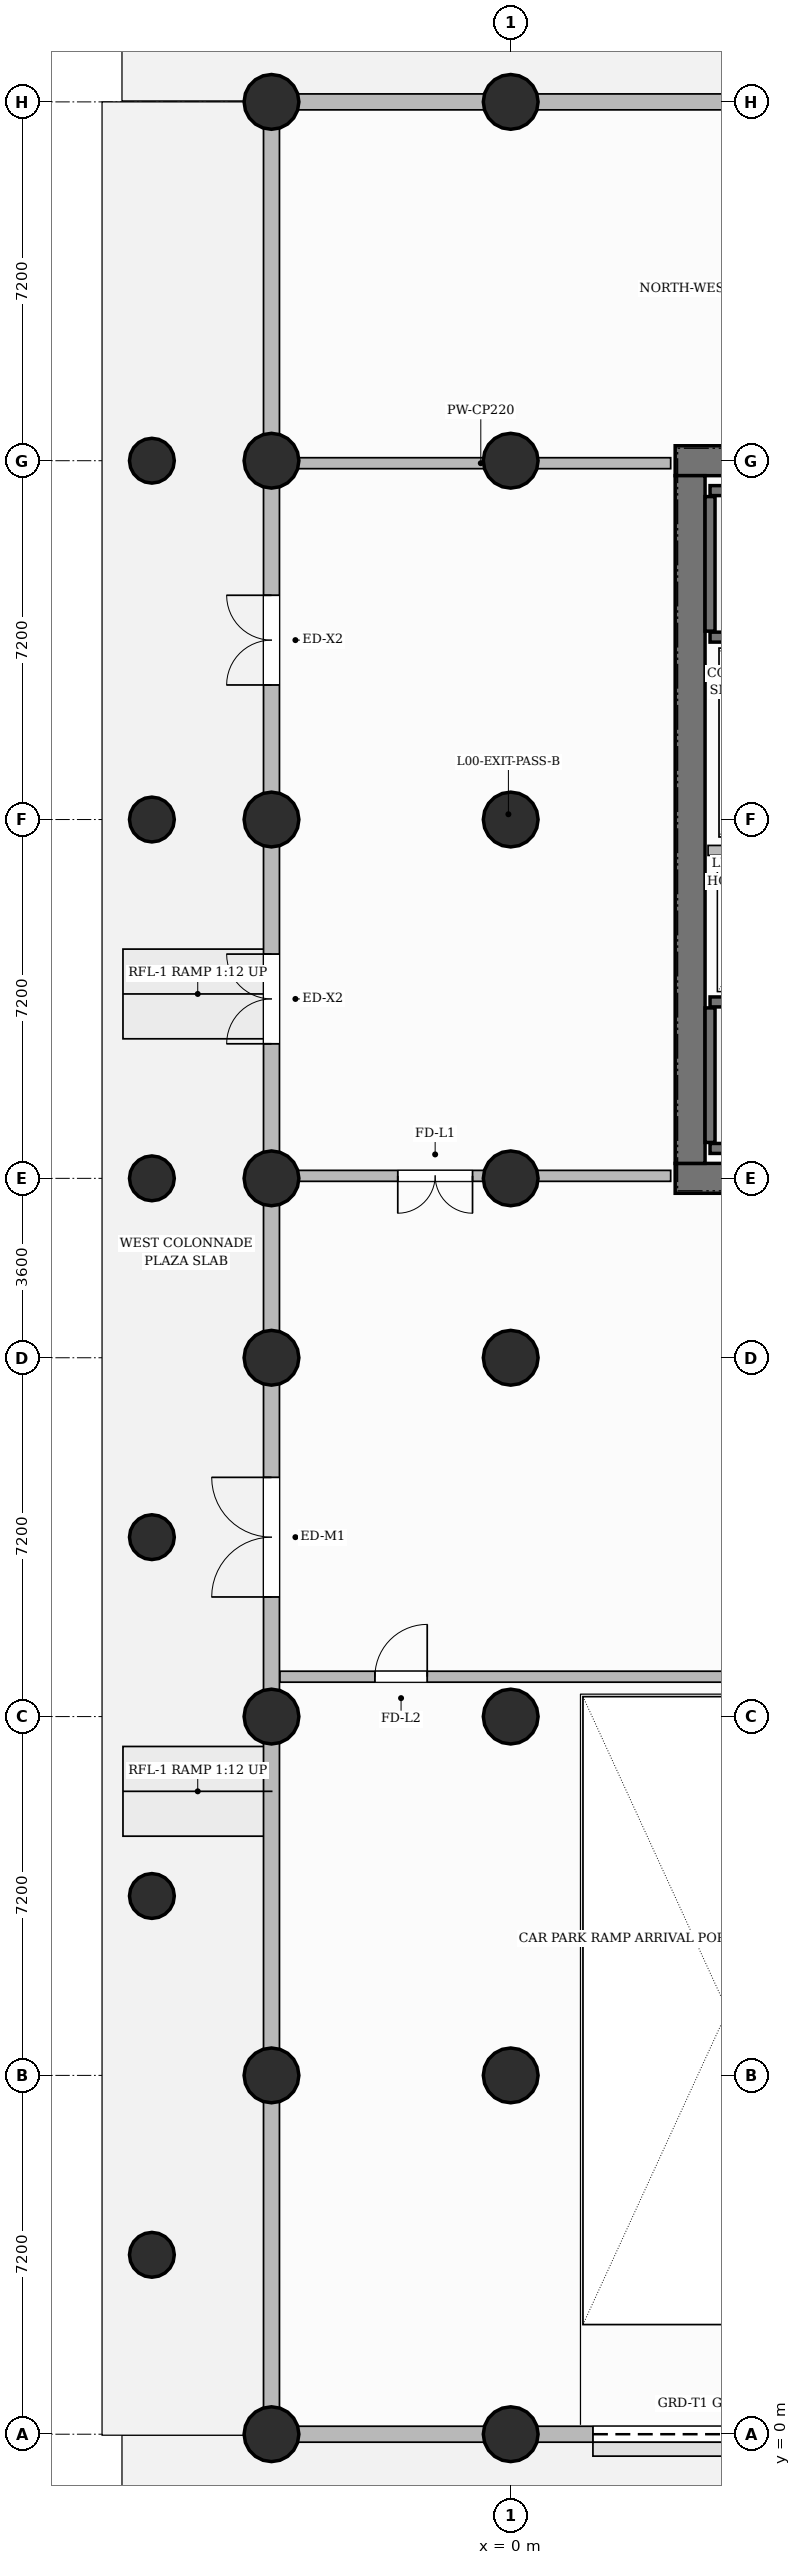
"""IFC4 building model, lengths in metres.
Left out: names, types, materials, properties, quantities, classifications, styles, units other than length and angle.
Written with IfcOpenShell. Run it as: python <this file> out.ifc"""

import sys

from ifc_helpers import new_model, si_unit, direction, frame, frame_2d, origin, origin_2d, place, context, subcontext, project, spatial, rectangle, circle, extrude, source, transform, mapped, element, fill, save


model = new_model("IFC4")
c1 = context("Model", 3, precision=1e-05, world=origin(), true_north=direction((0.0, 1.0)))
c2 = subcontext(c1, "Body", "Model", "MODEL_VIEW")
j1 = project(units=[si_unit("LENGTHUNIT", "METRE"), si_unit("PLANEANGLEUNIT", "RADIAN")], contexts=[c1])
p1 = place(None, origin())
s1 = spatial("IfcSite", under=j1, at=p1, CompositionType="ELEMENT")
p2 = place(p1, origin())
s2 = spatial("IfcBuilding", under=s1, at=p2, CompositionType="ELEMENT")
p3 = place(p2, origin())
s3 = spatial("IfcBuildingStorey", under=s2, at=p3, CompositionType="ELEMENT", Elevation=0.0)
for number, where, z_axis, x_axis in (
    (1, (3.3, 25.2, 0.0), (0.0, 0.0, 1.0), (1.0, 0.0, 0.0)),
    (2, (3.3, 39.6, 0.0), (0.0, 0.0, 1.0), (1.0, 0.0, 0.0)),
):
    element("IfcWall", number, at=place(p3, frame(where, z_axis=z_axis, x_axis=x_axis)), inside=s3, PredefinedType="SHEAR", context=c2, shape_type="SweptSolid", body=[
        extrude(rectangle(XDim=8.4, YDim=0.6, at=frame_2d((4.2, 0.0))), origin(), (0.0, 0.0, 1.0), 5.4),
    ])
p4 = place(p3, frame((3.6, 25.5, 0.0), z_axis=(0.0, 0.0, 1.0), x_axis=(0.0, 1.0, 0.0)))
e3 = element("IfcWall", 3, at=p4, inside=s3, PredefinedType="SHEAR", context=c2, shape_type="SweptSolid", body=[
    extrude(rectangle(XDim=13.8, YDim=0.6, at=frame_2d((6.9, 0.0))), origin(), (0.0, 0.0, 1.0), 5.4),
])
m1 = source(origin(), c2, "Body", "SweptSolid", [
    extrude(circle(Radius=0.55, at=origin_2d()), origin(), (0.0, 0.0, 1.0), 5.4),
])
for number, where, z_axis, x_axis in (
    (4, (-4.8, 0.0, 0.0), (0.0, 0.0, 1.0), (1.0, 0.0, 0.0)),
    (5, (-4.8, 7.2, 0.0), (0.0, 0.0, 1.0), (1.0, 0.0, 0.0)),
    (6, (-4.8, 14.4, 0.0), (0.0, 0.0, 1.0), (1.0, 0.0, 0.0)),
    (7, (-4.8, 21.6, 0.0), (0.0, 0.0, 1.0), (1.0, 0.0, 0.0)),
    (8, (-4.8, 25.2, 0.0), (0.0, 0.0, 1.0), (1.0, 0.0, 0.0)),
    (9, (-4.8, 32.4, 0.0), (0.0, 0.0, 1.0), (1.0, 0.0, 0.0)),
    (10, (-4.8, 39.6, 0.0), (0.0, 0.0, 1.0), (1.0, 0.0, 0.0)),
    (11, (-4.8, 46.8, 0.0), (0.0, 0.0, 1.0), (1.0, 0.0, 0.0)),
    (12, (0.0, 0.0, 0.0), (0.0, 0.0, 1.0), (1.0, 0.0, 0.0)),
    (13, (0.0, 7.2, 0.0), (0.0, 0.0, 1.0), (1.0, 0.0, 0.0)),
    (14, (0.0, 14.4, 0.0), (0.0, 0.0, 1.0), (1.0, 0.0, 0.0)),
    (15, (0.0, 21.6, 0.0), (0.0, 0.0, 1.0), (1.0, 0.0, 0.0)),
    (16, (0.0, 25.2, 0.0), (0.0, 0.0, 1.0), (1.0, 0.0, 0.0)),
    (17, (0.0, 32.4, 0.0), (0.0, 0.0, 1.0), (1.0, 0.0, 0.0)),
    (18, (0.0, 39.6, 0.0), (0.0, 0.0, 1.0), (1.0, 0.0, 0.0)),
    (19, (0.0, 46.8, 0.0), (0.0, 0.0, 1.0), (1.0, 0.0, 0.0)),
):
    element("IfcColumn", number, at=place(p3, frame(where, z_axis=z_axis, x_axis=x_axis)), inside=s3, PredefinedType="COLUMN", context=c2, shape_type="MappedRepresentation", body=[
        mapped(m1, transform((0.0, 0.0, 0.0), scale=1.0)),
    ])
m2 = source(origin(), c2, "Body", "SweptSolid", [
    extrude(circle(Radius=0.45, at=origin_2d()), origin(), (0.0, 0.0, 1.0), 5.4),
])
for number, where, z_axis, x_axis in (
    (20, (-7.2, 3.6, 0.0), (0.0, 0.0, 1.0), (1.0, 0.0, 0.0)),
    (21, (-7.2, 10.8, 0.0), (0.0, 0.0, 1.0), (1.0, 0.0, 0.0)),
    (22, (-7.2, 18.0, 0.0), (0.0, 0.0, 1.0), (1.0, 0.0, 0.0)),
    (23, (-7.2, 25.2, 0.0), (0.0, 0.0, 1.0), (1.0, 0.0, 0.0)),
    (24, (-7.2, 32.4, 0.0), (0.0, 0.0, 1.0), (1.0, 0.0, 0.0)),
    (25, (-7.2, 39.6, 0.0), (0.0, 0.0, 1.0), (1.0, 0.0, 0.0)),
):
    element("IfcColumn", number, at=place(p3, frame(where, z_axis=z_axis, x_axis=x_axis)), inside=s3, PredefinedType="COLUMN", context=c2, shape_type="MappedRepresentation", body=[
        mapped(m2, transform((0.0, 0.0, 0.0), scale=1.0)),
    ])
p5 = place(p3, frame((4.0, 25.8, 0.0), z_axis=(0.0, 0.0, 1.0), x_axis=(1.0, 0.0, 0.0)))
e26 = element("IfcWall", 26, at=p5, inside=s3, PredefinedType="SHEAR", context=c2, shape_type="SweptSolid", body=[
    extrude(rectangle(XDim=7.1, YDim=0.2, at=frame_2d((3.55, 0.0))), origin(), (0.0, 0.0, 1.0), 5.4),
])
p6 = place(p3, frame((4.0, 25.92, 0.0), z_axis=(0.0, 0.0, 1.0), x_axis=(0.0, 1.0, 0.0)))
e27 = element("IfcWall", 27, at=p6, inside=s3, PredefinedType="SHEAR", context=c2, shape_type="SweptSolid", body=[
    extrude(rectangle(XDim=2.7, YDim=0.2, at=frame_2d((1.35, 0.0))), origin(), (0.0, 0.0, 1.0), 5.4),
])
p7 = place(p3, frame((4.0, 28.74, 0.0), z_axis=(0.0, 0.0, 1.0), x_axis=(1.0, 0.0, 0.0)))
e28 = element("IfcWall", 28, at=p7, inside=s3, PredefinedType="SHEAR", context=c2, shape_type="SweptSolid", body=[
    extrude(rectangle(XDim=7.1, YDim=0.2, at=frame_2d((3.55, 0.0))), origin(), (0.0, 0.0, 1.0), 5.4),
])
p8 = place(p7, frame((5.815, 0.0, 0.0)))
e29 = element("IfcOpeningElement", 29, at=p8, cuts=e28, PredefinedType="OPENING", context=c2, shape_type="SweptSolid", body=[
    extrude(rectangle(XDim=1.05, YDim=2.2, at=frame_2d((0.525, 1.1))), frame((0.0, 0.11, 0.0), z_axis=(0.0, -1.0, 0.0), x_axis=(1.0, 0.0, 0.0)), (0.0, 0.0, 1.0), 0.22),
])
p9 = place(p3, frame((4.0, 39.0, 0.0), z_axis=(0.0, 0.0, 1.0), x_axis=(1.0, 0.0, 0.0)))
e30 = element("IfcWall", 30, at=p9, inside=s3, PredefinedType="SHEAR", context=c2, shape_type="SweptSolid", body=[
    extrude(rectangle(XDim=7.1, YDim=0.2, at=frame_2d((3.55, 0.0))), origin(), (0.0, 0.0, 1.0), 5.4),
])
p10 = place(p3, frame((4.0, 36.18, 0.0), z_axis=(0.0, 0.0, 1.0), x_axis=(0.0, 1.0, 0.0)))
e31 = element("IfcWall", 31, at=p10, inside=s3, PredefinedType="SHEAR", context=c2, shape_type="SweptSolid", body=[
    extrude(rectangle(XDim=2.7, YDim=0.2, at=frame_2d((1.35, 0.0))), origin(), (0.0, 0.0, 1.0), 5.4),
])
p11 = place(p3, frame((4.0, 36.06, 0.0), z_axis=(0.0, 0.0, 1.0), x_axis=(1.0, 0.0, 0.0)))
e32 = element("IfcWall", 32, at=p11, inside=s3, PredefinedType="SHEAR", context=c2, shape_type="SweptSolid", body=[
    extrude(rectangle(XDim=7.1, YDim=0.2, at=frame_2d((3.55, 0.0))), origin(), (0.0, 0.0, 1.0), 5.4),
])
p12 = place(p11, frame((5.815, 0.0, 0.0)))
e33 = element("IfcOpeningElement", 33, at=p12, cuts=e32, PredefinedType="OPENING", context=c2, shape_type="SweptSolid", body=[
    extrude(rectangle(XDim=1.05, YDim=2.2, at=frame_2d((0.525, 1.1))), frame((0.0, 0.11, 0.0), z_axis=(0.0, -1.0, 0.0), x_axis=(1.0, 0.0, 0.0)), (0.0, 0.0, 1.0), 0.22),
])
p13 = place(p3, frame((3.96, 31.78, 0.0), z_axis=(0.0, 0.0, 1.0), x_axis=(1.0, 0.0, 0.0)))
e34 = element("IfcWall", 34, at=p13, inside=s3, PredefinedType="PARTITIONING", context=c2, shape_type="SweptSolid", body=[
    extrude(rectangle(XDim=2.13, YDim=0.2, at=frame_2d((1.065, 0.0))), origin(), (0.0, 0.0, 1.0), 5.1),
])
p14 = place(p3, frame((-4.41, 25.25, 0.0), z_axis=(0.0, 0.0, 1.0), x_axis=(1.0, 0.0, 0.0)))
e35 = element("IfcWall", 35, at=p14, inside=s3, PredefinedType="PARTITIONING", context=c2, shape_type="SweptSolid", body=[
    extrude(rectangle(XDim=7.62, YDim=0.22, at=frame_2d((3.81, 0.0))), origin(), (0.0, 0.0, 1.0), 4.085),
])
p15 = place(p14, frame((2.144, 0.0, 0.0)))
e36 = element("IfcOpeningElement", 36, at=p15, cuts=e35, PredefinedType="OPENING", context=c2, shape_type="SweptSolid", body=[
    extrude(rectangle(XDim=1.5, YDim=2.2, at=frame_2d((0.75, 1.1))), frame((0.0, 0.12, 0.0), z_axis=(0.0, -1.0, 0.0), x_axis=(1.0, 0.0, 0.0)), (0.0, 0.0, 1.0), 0.24),
])
p16 = place(p3, frame((-4.41, 39.55, 0.0), z_axis=(0.0, 0.0, 1.0), x_axis=(1.0, 0.0, 0.0)))
e37 = element("IfcWall", 37, at=p16, inside=s3, PredefinedType="PARTITIONING", context=c2, shape_type="SweptSolid", body=[
    extrude(rectangle(XDim=7.62, YDim=0.22, at=frame_2d((3.81, 0.0))), origin(), (0.0, 0.0, 1.0), 4.085),
])
p17 = place(p3, frame((-4.632, 15.2, 0.0), z_axis=(0.0, 0.0, 1.0), x_axis=(1.0, 0.0, 0.0)))
e38 = element("IfcWall", 38, at=p17, inside=s3, PredefinedType="PARTITIONING", context=c2, shape_type="SweptSolid", body=[
    extrude(rectangle(XDim=13.142, YDim=0.22, at=frame_2d((6.571, 0.0))), origin(), (0.0, 0.0, 1.0), 5.1),
])
p18 = place(p17, frame((1.907, 0.0, 0.0)))
e39 = element("IfcOpeningElement", 39, at=p18, cuts=e38, PredefinedType="OPENING", context=c2, shape_type="SweptSolid", body=[
    extrude(rectangle(XDim=1.05, YDim=2.15, at=frame_2d((0.525, 1.075))), frame((0.0, 0.12, 0.0), z_axis=(0.0, -1.0, 0.0), x_axis=(1.0, 0.0, 0.0)), (0.0, 0.0, 1.0), 0.24),
])
p19 = place(p3, frame((-4.8, 0.0, 0.0), z_axis=(0.0, 0.0, 1.0), x_axis=(1.0, 0.0, 0.0)))
e40 = element("IfcWall", 40, at=p19, inside=s3, PredefinedType="SOLIDWALL", context=c2, shape_type="SweptSolid", body=[
    extrude(rectangle(XDim=26.85, YDim=0.32, at=frame_2d((13.425, 0.0))), origin(), (0.0, 0.0, 1.0), 4.085),
])
p20 = place(p19, frame((6.45, 0.0, 0.0)))
e41 = element("IfcOpeningElement", 41, at=p20, cuts=e40, PredefinedType="OPENING", context=c2, shape_type="SweptSolid", body=[
    extrude(rectangle(XDim=4.0, YDim=3.2, at=frame_2d((2.0, 1.6))), frame((0.0, 0.17, 0.0), z_axis=(0.0, -1.0, 0.0), x_axis=(1.0, 0.0, 0.0)), (0.0, 0.0, 1.0), 0.34),
])
p21 = place(p19, frame((21.6, 0.0, 0.0)))
e42 = element("IfcOpeningElement", 42, at=p21, cuts=e40, PredefinedType="OPENING", context=c2, shape_type="SweptSolid", body=[
    extrude(rectangle(XDim=2.4, YDim=2.8, at=frame_2d((1.2, 1.4))), frame((0.0, 0.17, 0.0), z_axis=(0.0, -1.0, 0.0), x_axis=(1.0, 0.0, 0.0)), (0.0, 0.0, 1.0), 0.34),
])
p22 = place(p3, frame((-4.8, 46.8, 0.0), z_axis=(0.0, 0.0, 1.0), x_axis=(1.0, 0.0, 0.0)))
e43 = element("IfcWall", 43, at=p22, inside=s3, PredefinedType="SOLIDWALL", context=c2, shape_type="SweptSolid", body=[
    extrude(rectangle(XDim=26.85, YDim=0.32, at=frame_2d((13.425, 0.0))), origin(), (0.0, 0.0, 1.0), 4.085),
])
p23 = place(p3, frame((-4.8, 0.05, 0.0), z_axis=(0.0, 0.0, 1.0), x_axis=(0.0, 1.0, 0.0)))
e44 = element("IfcWall", 44, at=p23, inside=s3, PredefinedType="SOLIDWALL", context=c2, shape_type="SweptSolid", body=[
    extrude(rectangle(XDim=46.7, YDim=0.32, at=frame_2d((23.35, 0.0))), origin(), (0.0, 0.0, 1.0), 4.085),
])
p24 = place(p23, frame((16.75, 0.0, 0.0)))
e45 = element("IfcOpeningElement", 45, at=p24, cuts=e44, PredefinedType="OPENING", context=c2, shape_type="SweptSolid", body=[
    extrude(rectangle(XDim=2.4, YDim=2.8, at=frame_2d((1.2, 1.4))), frame((0.0, 0.17, 0.0), z_axis=(0.0, -1.0, 0.0), x_axis=(1.0, 0.0, 0.0)), (0.0, 0.0, 1.0), 0.34),
])
p25 = place(p23, frame((27.85, 0.0, 0.0)))
e46 = element("IfcOpeningElement", 46, at=p25, cuts=e44, PredefinedType="OPENING", context=c2, shape_type="SweptSolid", body=[
    extrude(rectangle(XDim=1.8, YDim=2.4, at=frame_2d((0.9, 1.2))), frame((0.0, 0.17, 0.0), z_axis=(0.0, -1.0, 0.0), x_axis=(1.0, 0.0, 0.0)), (0.0, 0.0, 1.0), 0.34),
])
p26 = place(p23, frame((35.05, 0.0, 0.0)))
e47 = element("IfcOpeningElement", 47, at=p26, cuts=e44, PredefinedType="OPENING", context=c2, shape_type="SweptSolid", body=[
    extrude(rectangle(XDim=1.8, YDim=2.4, at=frame_2d((0.9, 1.2))), frame((0.0, 0.17, 0.0), z_axis=(0.0, -1.0, 0.0), x_axis=(1.0, 0.0, 0.0)), (0.0, 0.0, 1.0), 0.34),
])
m3 = source(origin(), c2, "Body", "SweptSolid", [
    extrude(rectangle(XDim=1.5, YDim=2.2, at=frame_2d((0.75, 1.1))), frame((0.0, 0.025, 0.0), z_axis=(0.0, -1.0, 0.0), x_axis=(1.0, 0.0, 0.0)), (0.0, 0.0, 1.0), 0.05),
])
p27 = place(p15, frame((1.5, 0.0, 0.0), z_axis=(0.0, 0.0, 1.0), x_axis=(-1.0, 0.0, 0.0)))
e48 = element("IfcDoor", 48, at=p27, inside=s3, OperationType="DOUBLE_DOOR_SINGLE_SWING", PredefinedType="DOOR", context=c2, shape_type="MappedRepresentation", body=[
    mapped(m3, transform((0.0, 0.0, 0.0), scale=1.0)),
])
fill(e36, e48)
m4 = source(origin(), c2, "Body", "SweptSolid", [
    extrude(rectangle(XDim=1.05, YDim=2.15, at=frame_2d((0.525, 1.075))), frame((0.0, 0.025, 0.0), z_axis=(0.0, -1.0, 0.0), x_axis=(1.0, 0.0, 0.0)), (0.0, 0.0, 1.0), 0.05),
])
p28 = place(p18, origin())
e49 = element("IfcDoor", 49, at=p28, inside=s3, OperationType="SINGLE_SWING_RIGHT", PredefinedType="DOOR", context=c2, shape_type="MappedRepresentation", body=[
    mapped(m4, transform((0.0, 0.0, 0.0), scale=1.0)),
])
fill(e39, e49)
m5 = source(origin(), c2, "Body", "SweptSolid", [
    extrude(rectangle(XDim=4.0, YDim=3.2, at=frame_2d((2.0, 1.6))), frame((0.0, 0.025, 0.0), z_axis=(0.0, -1.0, 0.0), x_axis=(1.0, 0.0, 0.0)), (0.0, 0.0, 1.0), 0.05),
])
p29 = place(p20, frame((4.0, 0.0, 0.0), z_axis=(0.0, 0.0, 1.0), x_axis=(-1.0, 0.0, 0.0)))
e50 = element("IfcDoor", 50, at=p29, inside=s3, OperationType="ROLLINGUP", PredefinedType="GATE", context=c2, shape_type="MappedRepresentation", body=[
    mapped(m5, transform((0.0, 0.0, 0.0), scale=1.0)),
])
fill(e41, e50)
m6 = source(origin(), c2, "Body", "SweptSolid", [
    extrude(rectangle(XDim=2.4, YDim=2.8, at=frame_2d((1.2, 1.4))), frame((0.0, 0.025, 0.0), z_axis=(0.0, -1.0, 0.0), x_axis=(1.0, 0.0, 0.0)), (0.0, 0.0, 1.0), 0.05),
])
p30 = place(p24, origin())
e51 = element("IfcDoor", 51, at=p30, inside=s3, OperationType="DOUBLE_DOOR_SINGLE_SWING", PredefinedType="DOOR", context=c2, shape_type="MappedRepresentation", body=[
    mapped(m6, transform((0.0, 0.0, 0.0), scale=1.0)),
])
fill(e45, e51)
m7 = source(origin(), c2, "Body", "SweptSolid", [
    extrude(rectangle(XDim=1.8, YDim=2.4, at=frame_2d((0.9, 1.2))), frame((0.0, 0.025, 0.0), z_axis=(0.0, -1.0, 0.0), x_axis=(1.0, 0.0, 0.0)), (0.0, 0.0, 1.0), 0.05),
])
p31 = place(p25, origin())
e52 = element("IfcDoor", 52, at=p31, inside=s3, OperationType="DOUBLE_DOOR_SINGLE_SWING", PredefinedType="DOOR", context=c2, shape_type="MappedRepresentation", body=[
    mapped(m7, transform((0.0, 0.0, 0.0), scale=1.0)),
])
fill(e46, e52)
p32 = place(p26, origin())
e53 = element("IfcDoor", 53, at=p32, inside=s3, OperationType="DOUBLE_DOOR_SINGLE_SWING", PredefinedType="DOOR", context=c2, shape_type="MappedRepresentation", body=[
    mapped(m7, transform((0.0, 0.0, 0.0), scale=1.0)),
])
fill(e47, e53)
save(model, sys.argv[1])
